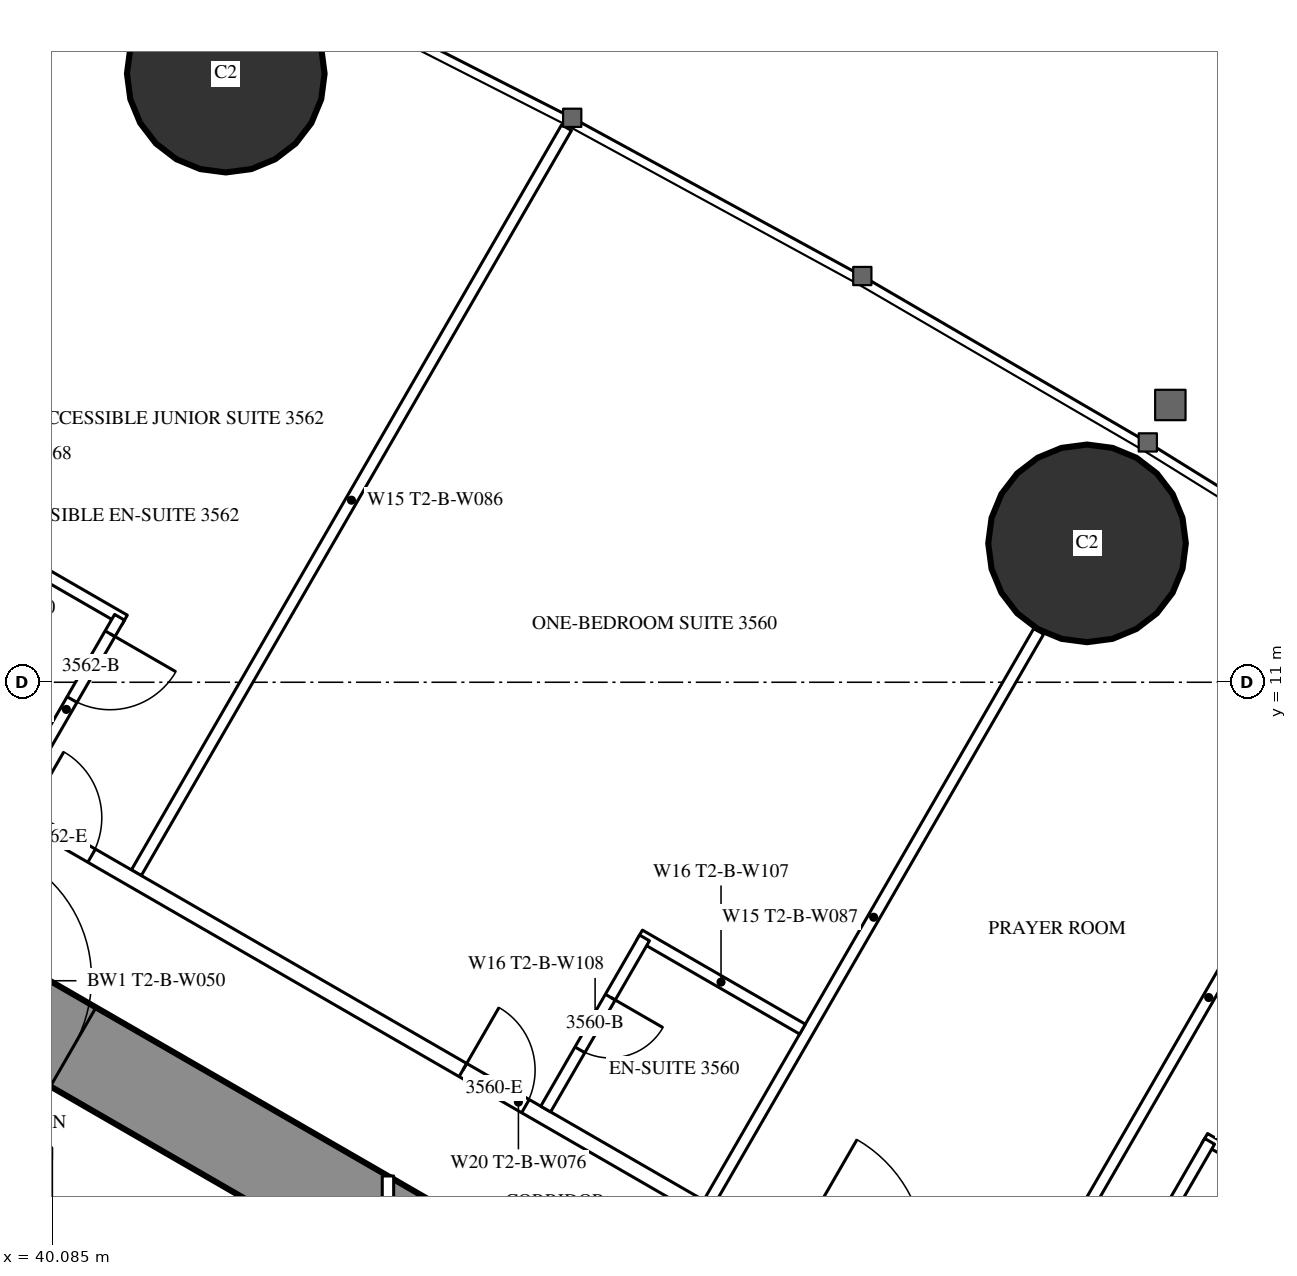
"""IFC4 building model, lengths in metres.
Left out: names, types, materials, properties, quantities, classifications, styles, units other than length and angle.
Written with IfcOpenShell. Run it as: python <this file> out.ifc"""

import sys

from ifc_helpers import new_model, si_unit, direction, frame, frame_2d, origin, origin_2d, place, context, subcontext, project, spatial, rectangle, hollow_circle, extrude, element, fill, save


model = new_model("IFC4")
c1 = context("Model", 3, precision=1e-05, world=origin(), true_north=direction((0.0, 1.0)))
c2 = subcontext(c1, "Body", "Model", "MODEL_VIEW")
j1 = project(units=[si_unit("LENGTHUNIT", "METRE"), si_unit("PLANEANGLEUNIT", "RADIAN")], contexts=[c1])
p1 = place(None, origin())
s1 = spatial("IfcSite", under=j1, at=p1, CompositionType="ELEMENT")
p2 = place(p1, origin())
s2 = spatial("IfcBuilding", under=s1, at=p2, CompositionType="ELEMENT")
p3 = place(p2, frame((0.0, 0.0, 132.6)))
s3 = spatial("IfcBuildingStorey", under=s2, at=p3, CompositionType="ELEMENT", Elevation=132.6)
for number, where, z_axis, x_axis in (
    (1, (53.697, 12.827, 0.0), (0.0, 0.0, 1.0), (1.0, 0.0, 0.0)),
    (2, (42.366, 19.007, 0.0), (0.0, 0.0, 1.0), (1.0, 0.0, 0.0)),
):
    element("IfcColumn", number, at=place(p3, frame(where, z_axis=z_axis, x_axis=x_axis)), inside=s3, PredefinedType="COLUMN", context=c2, shape_type="SweptSolid", body=[
        extrude(hollow_circle(Radius=1.3, WallThickness=0.1, at=origin_2d()), origin(), (0.0, 0.0, 1.0), 3.5),
    ])
p4 = place(p3, frame((27.2, 13.8, 0.0), z_axis=(0.0, 0.0, 1.0), x_axis=(0.866024515034, -0.500001539357, 0.0)))
e3 = element("IfcWall", 3, at=p4, inside=s3, PredefinedType="SHEAR", context=c2, shape_type="SweptSolid", body=[
    extrude(rectangle(XDim=26.907, YDim=1.2, at=frame_2d((13.454, 0.0))), origin(), (0.0, 0.0, 1.0), 3.5),
])
p5 = place(p4, frame((4.6, 0.0, 0.0)))
e4 = element("IfcOpeningElement", 4, at=p5, cuts=e3, PredefinedType="OPENING", context=c2, shape_type="SweptSolid", body=[
    extrude(rectangle(XDim=1.0, YDim=2.2, at=frame_2d((0.5, 1.1))), frame((0.0, 0.61, 0.0), z_axis=(0.0, -1.0, 0.0), x_axis=(1.0, 0.0, 0.0)), (0.0, 0.0, 1.0), 1.22),
])
p6 = place(p4, frame((13.395, 0.0, 0.0)))
e5 = element("IfcOpeningElement", 5, at=p6, cuts=e3, PredefinedType="OPENING", context=c2, shape_type="SweptSolid", body=[
    extrude(rectangle(XDim=1.8, YDim=2.2, at=frame_2d((0.9, 1.1))), frame((0.0, 0.61, 0.0), z_axis=(0.0, -1.0, 0.0), x_axis=(1.0, 0.0, 0.0)), (0.0, 0.0, 1.0), 1.22),
])
p7 = place(p3, frame((41.19, 8.494, 0.0), z_axis=(0.0, 0.0, 1.0), x_axis=(0.49999258054, 0.866029687369, 0.0)))
e6 = element("IfcWall", 6, at=p7, inside=s3, PredefinedType="PARTITIONING", context=c2, shape_type="SweptSolid", body=[
    extrude(rectangle(XDim=11.318, YDim=0.15, at=frame_2d((5.659, 0.0))), origin(), (0.0, 0.0, 1.0), 3.25),
])
p8 = place(p3, frame((48.719, 4.147, 0.0), z_axis=(0.0, 0.0, 1.0), x_axis=(0.499993328235, 0.866029255696, 0.0)))
e7 = element("IfcWall", 7, at=p8, inside=s3, PredefinedType="PARTITIONING", context=c2, shape_type="SweptSolid", body=[
    extrude(rectangle(XDim=8.686, YDim=0.15, at=frame_2d((4.343, 0.0))), origin(), (0.0, 0.0, 1.0), 2.2),
])
p9 = place(p3, frame((52.481, 1.975, 0.0), z_axis=(0.0, 0.0, 1.0), x_axis=(0.500003867771, 0.866023170714, 0.0)))
e8 = element("IfcWall", 8, at=p9, inside=s3, PredefinedType="PARTITIONING", context=c2, shape_type="SweptSolid", body=[
    extrude(rectangle(XDim=11.265, YDim=0.15, at=frame_2d((5.632, 0.0))), origin(), (0.0, 0.0, 1.0), 3.25),
])
p10 = place(p3, frame((36.834, 10.894, 0.0), z_axis=(0.0, 0.0, 1.0), x_axis=(0.866028157229, -0.499995230863, 0.0)))
e9 = element("IfcWall", 9, at=p10, inside=s3, PredefinedType="PARTITIONING", context=c2, shape_type="SweptSolid", body=[
    extrude(rectangle(XDim=21.667, YDim=0.2, at=frame_2d((10.833, 0.0))), origin(), (0.0, 0.0, 1.0), 3.25),
])
p11 = place(p10, frame((20.117, 0.0, 0.0)))
e10 = element("IfcOpeningElement", 10, at=p11, cuts=e9, PredefinedType="OPENING", context=c2, shape_type="SweptSolid", body=[
    extrude(rectangle(XDim=0.95, YDim=2.2, at=frame_2d((0.475, 1.1))), frame((0.0, 0.11, 0.0), z_axis=(0.0, -1.0, 0.0), x_axis=(1.0, 0.0, 0.0)), (0.0, 0.0, 1.0), 0.22),
])
p12 = place(p10, frame((14.938, 0.0, 0.0)))
e11 = element("IfcOpeningElement", 11, at=p12, cuts=e9, PredefinedType="OPENING", context=c2, shape_type="SweptSolid", body=[
    extrude(rectangle(XDim=1.8, YDim=2.2, at=frame_2d((0.9, 1.1))), frame((0.0, 0.11, 0.0), z_axis=(0.0, -1.0, 0.0), x_axis=(1.0, 0.0, 0.0)), (0.0, 0.0, 1.0), 0.22),
])
p13 = place(p10, frame((9.99, 0.0, 0.0)))
e12 = element("IfcOpeningElement", 12, at=p13, cuts=e9, PredefinedType="OPENING", context=c2, shape_type="SweptSolid", body=[
    extrude(rectangle(XDim=0.95, YDim=2.2, at=frame_2d((0.475, 1.1))), frame((0.0, 0.11, 0.0), z_axis=(0.0, -1.0, 0.0), x_axis=(1.0, 0.0, 0.0)), (0.0, 0.0, 1.0), 0.22),
])
p14 = place(p10, frame((3.35, 0.0, 0.0)))
e13 = element("IfcOpeningElement", 13, at=p14, cuts=e9, PredefinedType="OPENING", context=c2, shape_type="SweptSolid", body=[
    extrude(rectangle(XDim=1.0, YDim=2.2, at=frame_2d((0.5, 1.1))), frame((0.0, 0.11, 0.0), z_axis=(0.0, -1.0, 0.0), x_axis=(1.0, 0.0, 0.0)), (0.0, 0.0, 1.0), 0.22),
])
p15 = place(p3, frame((55.245, 4.998, 0.0), z_axis=(0.0, 0.0, 1.0), x_axis=(0.866006523861, -0.500032699561, 0.0)))
e14 = element("IfcWall", 14, at=p15, inside=s3, PredefinedType="PARTITIONING", context=c2, shape_type="SweptSolid", body=[
    extrude(rectangle(XDim=2.475, YDim=0.15, at=frame_2d((1.237, 0.0))), origin(), (0.0, 0.0, 1.0), 3.25),
])
p16 = place(p3, frame((54.01, 2.709, 0.0), z_axis=(0.0, 0.0, 1.0), x_axis=(0.500006934395, 0.866021400173, 0.0)))
e15 = element("IfcWall", 15, at=p16, inside=s3, PredefinedType="PARTITIONING", context=c2, shape_type="SweptSolid", body=[
    extrude(rectangle(XDim=2.6, YDim=0.15, at=frame_2d((1.3, 0.0))), origin(), (0.0, 0.0, 1.0), 3.25),
])
p17 = place(p16, frame((0.9, 0.0, 0.0)))
e16 = element("IfcOpeningElement", 16, at=p17, cuts=e15, PredefinedType="OPENING", context=c2, shape_type="SweptSolid", body=[
    extrude(rectangle(XDim=0.8, YDim=2.2, at=frame_2d((0.4, 1.1))), frame((0.0, 0.085, 0.0), z_axis=(0.0, -1.0, 0.0), x_axis=(1.0, 0.0, 0.0)), (0.0, 0.0, 1.0), 0.17),
])
p18 = place(p3, frame((47.81, 7.674, 0.0), z_axis=(0.0, 0.0, 1.0), x_axis=(0.866031185235, -0.4999899861, 0.0)))
e17 = element("IfcWall", 17, at=p18, inside=s3, PredefinedType="PARTITIONING", context=c2, shape_type="SweptSolid", body=[
    extrude(rectangle(XDim=2.475, YDim=0.15, at=frame_2d((1.238, 0.0))), origin(), (0.0, 0.0, 1.0), 3.25),
])
p19 = place(p3, frame((46.575, 5.385, 0.0), z_axis=(0.0, 0.0, 1.0), x_axis=(0.500006934395, 0.866021400173, 0.0)))
e18 = element("IfcWall", 18, at=p19, inside=s3, PredefinedType="PARTITIONING", context=c2, shape_type="SweptSolid", body=[
    extrude(rectangle(XDim=2.6, YDim=0.15, at=frame_2d((1.3, 0.0))), origin(), (0.0, 0.0, 1.0), 3.25),
])
p20 = place(p19, frame((0.9, 0.0, 0.0)))
e19 = element("IfcOpeningElement", 19, at=p20, cuts=e18, PredefinedType="OPENING", context=c2, shape_type="SweptSolid", body=[
    extrude(rectangle(XDim=0.8, YDim=2.2, at=frame_2d((0.4, 1.1))), frame((0.0, 0.085, 0.0), z_axis=(0.0, -1.0, 0.0), x_axis=(1.0, 0.0, 0.0)), (0.0, 0.0, 1.0), 0.17),
])
p21 = place(p3, frame((38.544, 13.255, 0.0), z_axis=(0.0, 0.0, 1.0), x_axis=(0.866018712932, -0.500011588718, 0.0)))
e20 = element("IfcWall", 20, at=p21, inside=s3, PredefinedType="PARTITIONING", context=c2, shape_type="SweptSolid", body=[
    extrude(rectangle(XDim=2.875, YDim=0.15, at=frame_2d((1.438, 0.0))), origin(), (0.0, 0.0, 1.0), 3.25),
])
p22 = place(p3, frame((39.569, 9.43, 0.0), z_axis=(0.0, 0.0, 1.0), x_axis=(0.49998411664, 0.866034573852, 0.0)))
e21 = element("IfcWall", 21, at=p22, inside=s3, PredefinedType="PARTITIONING", context=c2, shape_type="SweptSolid", body=[
    extrude(rectangle(XDim=2.8, YDim=0.15, at=frame_2d((1.4, 0.0))), origin(), (0.0, 0.0, 1.0), 3.25),
])
p23 = place(p22, frame((1.55, 0.0, 0.0)))
e22 = element("IfcOpeningElement", 22, at=p23, cuts=e21, PredefinedType="OPENING", context=c2, shape_type="SweptSolid", body=[
    extrude(rectangle(XDim=1.0, YDim=2.2, at=frame_2d((0.5, 1.1))), frame((0.0, 0.085, 0.0), z_axis=(0.0, -1.0, 0.0), x_axis=(1.0, 0.0, 0.0)), (0.0, 0.0, 1.0), 0.17),
])
p24 = place(p3, frame((44.5, -4.505, 0.0), z_axis=(0.0, 0.0, 1.0), x_axis=(0.0, 1.0, 0.0)))
e23 = element("IfcWall", 23, at=p24, inside=s3, PredefinedType="PARTITIONING", context=c2, shape_type="SweptSolid", body=[
    extrude(rectangle(XDim=9.009, YDim=0.15, at=frame_2d((4.505, 0.0))), origin(), (0.0, 0.0, 1.0), 2.45),
])
p25 = place(p24, frame((4.005, 0.0, 0.0)))
e24 = element("IfcOpeningElement", 24, at=p25, cuts=e23, PredefinedType="OPENING", context=c2, shape_type="SweptSolid", body=[
    extrude(rectangle(XDim=1.0, YDim=2.2, at=frame_2d((0.5, 1.1))), frame((0.0, 0.085, 0.0), z_axis=(0.0, -1.0, 0.0), x_axis=(1.0, 0.0, 0.0)), (0.0, 0.0, 1.0), 0.17),
])
p26 = place(p20, origin())
e25 = element("IfcDoor", 25, at=p26, inside=s3, OperationType="SINGLE_SWING_RIGHT", PredefinedType="DOOR", context=c2, shape_type="SweptSolid", body=[
    extrude(rectangle(XDim=0.8, YDim=2.2, at=frame_2d((0.4, 1.1))), frame((0.0, 0.025, 0.0), z_axis=(0.0, -1.0, 0.0), x_axis=(1.0, 0.0, 0.0)), (0.0, 0.0, 1.0), 0.05),
])
fill(e19, e25)
p27 = place(p13, origin())
e26 = element("IfcDoor", 26, at=p27, inside=s3, OperationType="SINGLE_SWING_LEFT", PredefinedType="DOOR", context=c2, shape_type="SweptSolid", body=[
    extrude(rectangle(XDim=0.95, YDim=2.2, at=frame_2d((0.475, 1.1))), frame((0.0, 0.025, 0.0), z_axis=(0.0, -1.0, 0.0), x_axis=(1.0, 0.0, 0.0)), (0.0, 0.0, 1.0), 0.05),
])
fill(e12, e26)
p28 = place(p23, origin())
e27 = element("IfcDoor", 27, at=p28, inside=s3, OperationType="SINGLE_SWING_RIGHT", PredefinedType="DOOR", context=c2, shape_type="SweptSolid", body=[
    extrude(rectangle(XDim=1.0, YDim=2.2, at=frame_2d((0.5, 1.1))), frame((0.0, 0.025, 0.0), z_axis=(0.0, -1.0, 0.0), x_axis=(1.0, 0.0, 0.0)), (0.0, 0.0, 1.0), 0.05),
])
fill(e22, e27)
p29 = place(p14, origin())
e28 = element("IfcDoor", 28, at=p29, inside=s3, OperationType="SINGLE_SWING_LEFT", PredefinedType="DOOR", context=c2, shape_type="SweptSolid", body=[
    extrude(rectangle(XDim=1.0, YDim=2.2, at=frame_2d((0.5, 1.1))), frame((0.0, 0.025, 0.0), z_axis=(0.0, -1.0, 0.0), x_axis=(1.0, 0.0, 0.0)), (0.0, 0.0, 1.0), 0.05),
])
fill(e13, e28)
p30 = place(p6, origin())
e29 = element("IfcDoor", 29, at=p30, inside=s3, OperationType="DOUBLE_DOOR_SINGLE_SWING", PredefinedType="DOOR", context=c2, shape_type="SweptSolid", body=[
    extrude(rectangle(XDim=1.8, YDim=2.2, at=frame_2d((0.9, 1.1))), frame((0.0, 0.025, 0.0), z_axis=(0.0, -1.0, 0.0), x_axis=(1.0, 0.0, 0.0)), (0.0, 0.0, 1.0), 0.05),
])
fill(e5, e29)
save(model, sys.argv[1])
